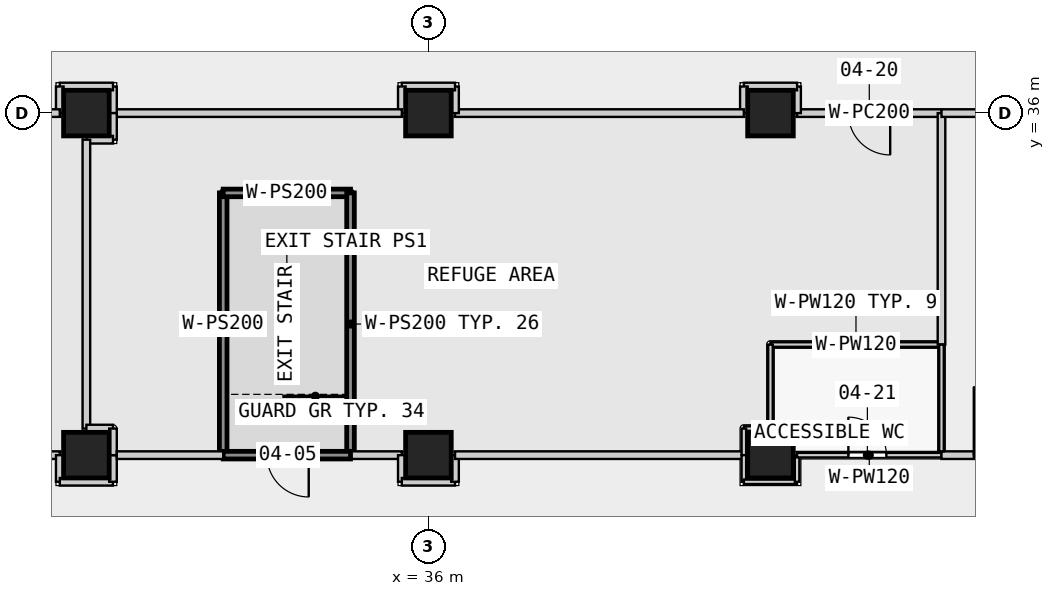
"""IFC4 building model, lengths in metres.
Left out: names, types, materials, properties, quantities, classifications, styles, units other than length and angle.
Written with IfcOpenShell. Run it as: python <this file> out.ifc"""

import sys

from ifc_helpers import new_model, si_unit, direction, frame, frame_2d, origin, origin_2d, place, context, subcontext, project, spatial, rectangle, extrude, element, fill, save


model = new_model("IFC4")
c1 = context("Model", 3, precision=1e-05, world=origin(), true_north=direction((0.0, 1.0)))
c2 = subcontext(c1, "Body", "Model", "MODEL_VIEW")
j1 = project(units=[si_unit("LENGTHUNIT", "METRE"), si_unit("PLANEANGLEUNIT", "RADIAN")], contexts=[c1])
p1 = place(None, origin())
s1 = spatial("IfcSite", under=j1, at=p1, CompositionType="ELEMENT")
p2 = place(p1, origin())
s2 = spatial("IfcBuilding", under=s1, at=p2, CompositionType="ELEMENT")
p3 = place(p2, frame((0.0, 0.0, 21.8)))
s3 = spatial("IfcBuildingStorey", under=s2, at=p3, CompositionType="ELEMENT", Elevation=21.8)
for number, where, z_axis, x_axis in (
    (1, (27.0, 27.0, 0.0), (0.0, 0.0, 1.0), (1.0, 0.0, 0.0)),
    (2, (27.0, 36.0, 0.0), (0.0, 0.0, 1.0), (1.0, 0.0, 0.0)),
    (3, (36.0, 27.0, 0.0), (0.0, 0.0, 1.0), (1.0, 0.0, 0.0)),
    (4, (36.0, 36.0, 0.0), (0.0, 0.0, 1.0), (1.0, 0.0, 0.0)),
    (5, (45.0, 27.0, 0.0), (0.0, 0.0, 1.0), (1.0, 0.0, 0.0)),
    (6, (45.0, 36.0, 0.0), (0.0, 0.0, 1.0), (1.0, 0.0, 0.0)),
):
    element("IfcColumn", number, at=place(p3, frame(where, z_axis=z_axis, x_axis=x_axis)), inside=s3, PredefinedType="COLUMN", context=c2, shape_type="SweptSolid", body=[
        extrude(rectangle(XDim=1.2, YDim=1.2, at=origin_2d()), origin(), (0.0, 0.0, 1.0), 5.0),
    ])
p4 = place(p3, frame((49.5, 36.0, 0.0), z_axis=(0.0, 0.0, 1.0), x_axis=(-1.0, 0.0, 0.0)))
e7 = element("IfcWall", 7, at=p4, inside=s3, PredefinedType="PARTITIONING", context=c2, shape_type="SweptSolid", body=[
    extrude(rectangle(XDim=3.8, YDim=0.2, at=frame_2d((1.9, 0.0))), origin(), (0.0, 0.0, 1.0), 4.5),
])
p5 = place(p4, frame((1.35, 0.0, 0.0)))
e8 = element("IfcOpeningElement", 8, at=p5, cuts=e7, PredefinedType="OPENING", context=c2, shape_type="SweptSolid", body=[
    extrude(rectangle(XDim=1.1, YDim=2.1, at=frame_2d((0.55, 1.05))), frame((0.0, 0.11, 0.0), z_axis=(0.0, -1.0, 0.0), x_axis=(1.0, 0.0, 0.0)), (0.0, 0.0, 1.0), 0.22),
])
p6 = place(p3, frame((45.7, 36.0, 0.0), z_axis=(0.0, 0.0, 1.0), x_axis=(0.0, 1.0, 0.0)))
e9 = element("IfcWall", 9, at=p6, inside=s3, PredefinedType="PARTITIONING", context=c2, shape_type="SweptSolid", body=[
    extrude(rectangle(XDim=0.7, YDim=0.2, at=frame_2d((0.35, 0.0))), origin(), (0.0, 0.0, 1.0), 4.5),
])
p7 = place(p3, frame((45.7, 36.7, 0.0), z_axis=(0.0, 0.0, 1.0), x_axis=(-1.0, 0.0, 0.0)))
e10 = element("IfcWall", 10, at=p7, inside=s3, PredefinedType="PARTITIONING", context=c2, shape_type="SweptSolid", body=[
    extrude(rectangle(XDim=1.4, YDim=0.2, at=frame_2d((0.7, 0.0))), origin(), (0.0, 0.0, 1.0), 4.5),
])
p8 = place(p3, frame((44.3, 36.7, 0.0), z_axis=(0.0, 0.0, 1.0), x_axis=(0.0, -1.0, 0.0)))
e11 = element("IfcWall", 11, at=p8, inside=s3, PredefinedType="PARTITIONING", context=c2, shape_type="SweptSolid", body=[
    extrude(rectangle(XDim=0.7, YDim=0.2, at=frame_2d((0.35, 0.0))), origin(), (0.0, 0.0, 1.0), 4.5),
])
p9 = place(p3, frame((44.3, 36.0, 0.0), z_axis=(0.0, 0.0, 1.0), x_axis=(-1.0, 0.0, 0.0)))
e12 = element("IfcWall", 12, at=p9, inside=s3, PredefinedType="PARTITIONING", context=c2, shape_type="SweptSolid", body=[
    extrude(rectangle(XDim=7.6, YDim=0.2, at=frame_2d((3.8, 0.0))), origin(), (0.0, 0.0, 1.0), 4.5),
])
p10 = place(p3, frame((36.7, 36.0, 0.0), z_axis=(0.0, 0.0, 1.0), x_axis=(0.0, 1.0, 0.0)))
e13 = element("IfcWall", 13, at=p10, inside=s3, PredefinedType="PARTITIONING", context=c2, shape_type="SweptSolid", body=[
    extrude(rectangle(XDim=0.7, YDim=0.2, at=frame_2d((0.35, 0.0))), origin(), (0.0, 0.0, 1.0), 4.5),
])
p11 = place(p3, frame((36.7, 36.7, 0.0), z_axis=(0.0, 0.0, 1.0), x_axis=(-1.0, 0.0, 0.0)))
e14 = element("IfcWall", 14, at=p11, inside=s3, PredefinedType="PARTITIONING", context=c2, shape_type="SweptSolid", body=[
    extrude(rectangle(XDim=1.4, YDim=0.2, at=frame_2d((0.7, 0.0))), origin(), (0.0, 0.0, 1.0), 4.5),
])
p12 = place(p3, frame((35.3, 36.7, 0.0), z_axis=(0.0, 0.0, 1.0), x_axis=(0.0, -1.0, 0.0)))
e15 = element("IfcWall", 15, at=p12, inside=s3, PredefinedType="PARTITIONING", context=c2, shape_type="SweptSolid", body=[
    extrude(rectangle(XDim=0.7, YDim=0.2, at=frame_2d((0.35, 0.0))), origin(), (0.0, 0.0, 1.0), 4.5),
])
p13 = place(p3, frame((35.3, 36.0, 0.0), z_axis=(0.0, 0.0, 1.0), x_axis=(-1.0, 0.0, 0.0)))
e16 = element("IfcWall", 16, at=p13, inside=s3, PredefinedType="PARTITIONING", context=c2, shape_type="SweptSolid", body=[
    extrude(rectangle(XDim=7.6, YDim=0.2, at=frame_2d((3.8, 0.0))), origin(), (0.0, 0.0, 1.0), 4.5),
])
p14 = place(p3, frame((30.6, 27.0, 0.0), z_axis=(0.0, 0.0, 1.0), x_axis=(0.0, 1.0, 0.0)))
e17 = element("IfcWall", 17, at=p14, inside=s3, PredefinedType="PARTITIONING", context=c2, shape_type="SweptSolid", body=[
    extrude(rectangle(XDim=6.9, YDim=0.2, at=frame_2d((3.45, 0.0))), origin(), (0.0, 0.0, 1.0), 4.5),
])
p15 = place(p3, frame((30.6, 33.9, 0.0), z_axis=(0.0, 0.0, 1.0), x_axis=(1.0, 0.0, 0.0)))
e18 = element("IfcWall", 18, at=p15, inside=s3, PredefinedType="PARTITIONING", context=c2, shape_type="SweptSolid", body=[
    extrude(rectangle(XDim=3.35, YDim=0.2, at=frame_2d((1.675, 0.0))), origin(), (0.0, 0.0, 1.0), 4.5),
])
p16 = place(p3, frame((33.95, 33.9, 0.0), z_axis=(0.0, 0.0, 1.0), x_axis=(0.0, -1.0, 0.0)))
e19 = element("IfcWall", 19, at=p16, inside=s3, PredefinedType="PARTITIONING", context=c2, shape_type="SweptSolid", body=[
    extrude(rectangle(XDim=6.9, YDim=0.2, at=frame_2d((3.45, 0.0))), origin(), (0.0, 0.0, 1.0), 4.5),
])
p17 = place(p3, frame((27.7, 36.0, 0.0), z_axis=(0.0, 0.0, 1.0), x_axis=(0.0, 1.0, 0.0)))
e20 = element("IfcWall", 20, at=p17, inside=s3, PredefinedType="PARTITIONING", context=c2, shape_type="SweptSolid", body=[
    extrude(rectangle(XDim=0.7, YDim=0.2, at=frame_2d((0.35, 0.0))), origin(), (0.0, 0.0, 1.0), 4.5),
])
p18 = place(p3, frame((27.7, 36.7, 0.0), z_axis=(0.0, 0.0, 1.0), x_axis=(-1.0, 0.0, 0.0)))
e21 = element("IfcWall", 21, at=p18, inside=s3, PredefinedType="PARTITIONING", context=c2, shape_type="SweptSolid", body=[
    extrude(rectangle(XDim=1.4, YDim=0.2, at=frame_2d((0.7, 0.0))), origin(), (0.0, 0.0, 1.0), 4.5),
])
p19 = place(p3, frame((26.3, 36.7, 0.0), z_axis=(0.0, 0.0, 1.0), x_axis=(0.0, -1.0, 0.0)))
e22 = element("IfcWall", 22, at=p19, inside=s3, PredefinedType="PARTITIONING", context=c2, shape_type="SweptSolid", body=[
    extrude(rectangle(XDim=0.7, YDim=0.2, at=frame_2d((0.35, 0.0))), origin(), (0.0, 0.0, 1.0), 4.5),
])
p20 = place(p3, frame((26.3, 36.0, 0.0), z_axis=(0.0, 0.0, 1.0), x_axis=(-1.0, 0.0, 0.0)))
e23 = element("IfcWall", 23, at=p20, inside=s3, PredefinedType="PARTITIONING", context=c2, shape_type="SweptSolid", body=[
    extrude(rectangle(XDim=7.3, YDim=0.2, at=frame_2d((3.65, 0.0))), origin(), (0.0, 0.0, 1.0), 4.5),
])
p21 = place(p20, frame((3.1, 0.0, 0.0)))
e24 = element("IfcOpeningElement", 24, at=p21, cuts=e23, PredefinedType="OPENING", context=c2, shape_type="SweptSolid", body=[
    extrude(rectangle(XDim=1.1, YDim=2.1, at=frame_2d((0.55, 1.05))), frame((0.0, 0.11, 0.0), z_axis=(0.0, -1.0, 0.0), x_axis=(1.0, 0.0, 0.0)), (0.0, 0.0, 1.0), 0.22),
])
p22 = place(p3, frame((33.95, 27.0, 0.0), z_axis=(0.0, 0.0, 1.0), x_axis=(1.0, 0.0, 0.0)))
e25 = element("IfcWall", 25, at=p22, inside=s3, PredefinedType="PARTITIONING", context=c2, shape_type="SweptSolid", body=[
    extrude(rectangle(XDim=1.35, YDim=0.2, at=frame_2d((0.675, 0.0))), origin(), (0.0, 0.0, 1.0), 4.5),
])
p23 = place(p3, frame((35.3, 27.0, 0.0), z_axis=(0.0, 0.0, 1.0), x_axis=(0.0, -1.0, 0.0)))
e26 = element("IfcWall", 26, at=p23, inside=s3, PredefinedType="PARTITIONING", context=c2, shape_type="SweptSolid", body=[
    extrude(rectangle(XDim=0.7, YDim=0.2, at=frame_2d((0.35, 0.0))), origin(), (0.0, 0.0, 1.0), 4.5),
])
p24 = place(p3, frame((35.3, 26.3, 0.0), z_axis=(0.0, 0.0, 1.0), x_axis=(1.0, 0.0, 0.0)))
e27 = element("IfcWall", 27, at=p24, inside=s3, PredefinedType="PARTITIONING", context=c2, shape_type="SweptSolid", body=[
    extrude(rectangle(XDim=1.4, YDim=0.2, at=frame_2d((0.7, 0.0))), origin(), (0.0, 0.0, 1.0), 4.5),
])
p25 = place(p3, frame((36.7, 26.3, 0.0), z_axis=(0.0, 0.0, 1.0), x_axis=(0.0, 1.0, 0.0)))
e28 = element("IfcWall", 28, at=p25, inside=s3, PredefinedType="PARTITIONING", context=c2, shape_type="SweptSolid", body=[
    extrude(rectangle(XDim=0.7, YDim=0.2, at=frame_2d((0.35, 0.0))), origin(), (0.0, 0.0, 1.0), 4.5),
])
for number, where, z_axis, x_axis in (
    (29, (36.7, 27.0, 0.0), (0.0, 0.0, 1.0), (1.0, 0.0, 0.0)),
    (30, (18.7, 27.0, 0.0), (0.0, 0.0, 1.0), (1.0, 0.0, 0.0)),
):
    element("IfcWall", number, at=place(p3, frame(where, z_axis=z_axis, x_axis=x_axis)), inside=s3, PredefinedType="PARTITIONING", context=c2, shape_type="SweptSolid", body=[
        extrude(rectangle(XDim=7.6, YDim=0.2, at=frame_2d((3.8, 0.0))), origin(), (0.0, 0.0, 1.0), 4.5),
    ])
p26 = place(p3, frame((26.3, 27.0, 0.0), z_axis=(0.0, 0.0, 1.0), x_axis=(0.0, -1.0, 0.0)))
e31 = element("IfcWall", 31, at=p26, inside=s3, PredefinedType="PARTITIONING", context=c2, shape_type="SweptSolid", body=[
    extrude(rectangle(XDim=0.7, YDim=0.2, at=frame_2d((0.35, 0.0))), origin(), (0.0, 0.0, 1.0), 4.5),
])
p27 = place(p3, frame((26.3, 26.3, 0.0), z_axis=(0.0, 0.0, 1.0), x_axis=(1.0, 0.0, 0.0)))
e32 = element("IfcWall", 32, at=p27, inside=s3, PredefinedType="PARTITIONING", context=c2, shape_type="SweptSolid", body=[
    extrude(rectangle(XDim=1.4, YDim=0.2, at=frame_2d((0.7, 0.0))), origin(), (0.0, 0.0, 1.0), 4.5),
])
for number, where, z_axis, x_axis in (
    (33, (27.7, 26.3, 0.0), (0.0, 0.0, 1.0), (0.0, 1.0, 0.0)),
    (34, (27.7, 36.0, 0.0), (0.0, 0.0, 1.0), (0.0, -1.0, 0.0)),
    (35, (27.7, 35.3, 0.0), (0.0, 0.0, 1.0), (-1.0, 0.0, 0.0)),
):
    element("IfcWall", number, at=place(p3, frame(where, z_axis=z_axis, x_axis=x_axis)), inside=s3, PredefinedType="PARTITIONING", context=c2, shape_type="SweptSolid", body=[
        extrude(rectangle(XDim=0.7, YDim=0.2, at=frame_2d((0.35, 0.0))), origin(), (0.0, 0.0, 1.0), 4.5),
    ])
p28 = place(p3, frame((27.0, 35.3, 0.0), z_axis=(0.0, 0.0, 1.0), x_axis=(0.0, -1.0, 0.0)))
e36 = element("IfcWall", 36, at=p28, inside=s3, PredefinedType="PARTITIONING", context=c2, shape_type="SweptSolid", body=[
    extrude(rectangle(XDim=7.6, YDim=0.2, at=frame_2d((3.8, 0.0))), origin(), (0.0, 0.0, 1.0), 4.5),
])
for number, where, z_axis, x_axis in (
    (37, (27.0, 27.7, 0.0), (0.0, 0.0, 1.0), (1.0, 0.0, 0.0)),
    (38, (27.7, 27.7, 0.0), (0.0, 0.0, 1.0), (0.0, -1.0, 0.0)),
):
    element("IfcWall", number, at=place(p3, frame(where, z_axis=z_axis, x_axis=x_axis)), inside=s3, PredefinedType="PARTITIONING", context=c2, shape_type="SweptSolid", body=[
        extrude(rectangle(XDim=0.7, YDim=0.2, at=frame_2d((0.35, 0.0))), origin(), (0.0, 0.0, 1.0), 4.5),
    ])
p29 = place(p3, frame((49.5, 29.911, 0.0), z_axis=(0.0, 0.0, 1.0), x_axis=(-1.0, 0.0, 0.0)))
e39 = element("IfcWall", 39, at=p29, inside=s3, PredefinedType="PARTITIONING", context=c2, shape_type="SweptSolid", body=[
    extrude(rectangle(XDim=4.5, YDim=0.12, at=frame_2d((2.25, 0.0))), origin(), (0.0, 0.0, 1.0), 4.5),
])
p30 = place(p3, frame((45.0, 29.911, 0.0), z_axis=(0.0, 0.0, 1.0), x_axis=(0.0, -1.0, 0.0)))
e40 = element("IfcWall", 40, at=p30, inside=s3, PredefinedType="PARTITIONING", context=c2, shape_type="SweptSolid", body=[
    extrude(rectangle(XDim=2.211, YDim=0.12, at=frame_2d((1.105, 0.0))), origin(), (0.0, 0.0, 1.0), 4.5),
])
for number, where, z_axis, x_axis in (
    (41, (45.0, 27.7, 0.0), (0.0, 0.0, 1.0), (-1.0, 0.0, 0.0)),
    (42, (44.3, 27.7, 0.0), (0.0, 0.0, 1.0), (0.0, -1.0, 0.0)),
    (43, (44.3, 27.0, 0.0), (0.0, 0.0, 1.0), (0.0, -1.0, 0.0)),
):
    element("IfcWall", number, at=place(p3, frame(where, z_axis=z_axis, x_axis=x_axis)), inside=s3, PredefinedType="PARTITIONING", context=c2, shape_type="SweptSolid", body=[
        extrude(rectangle(XDim=0.7, YDim=0.12, at=frame_2d((0.35, 0.0))), origin(), (0.0, 0.0, 1.0), 4.5),
    ])
p31 = place(p3, frame((44.3, 26.3, 0.0), z_axis=(0.0, 0.0, 1.0), x_axis=(1.0, 0.0, 0.0)))
e44 = element("IfcWall", 44, at=p31, inside=s3, PredefinedType="PARTITIONING", context=c2, shape_type="SweptSolid", body=[
    extrude(rectangle(XDim=1.4, YDim=0.12, at=frame_2d((0.7, 0.0))), origin(), (0.0, 0.0, 1.0), 4.5),
])
p32 = place(p3, frame((45.7, 26.3, 0.0), z_axis=(0.0, 0.0, 1.0), x_axis=(0.0, 1.0, 0.0)))
e45 = element("IfcWall", 45, at=p32, inside=s3, PredefinedType="PARTITIONING", context=c2, shape_type="SweptSolid", body=[
    extrude(rectangle(XDim=0.7, YDim=0.12, at=frame_2d((0.35, 0.0))), origin(), (0.0, 0.0, 1.0), 4.5),
])
p33 = place(p3, frame((45.7, 27.0, 0.0), z_axis=(0.0, 0.0, 1.0), x_axis=(1.0, 0.0, 0.0)))
e46 = element("IfcWall", 46, at=p33, inside=s3, PredefinedType="PARTITIONING", context=c2, shape_type="SweptSolid", body=[
    extrude(rectangle(XDim=3.8, YDim=0.12, at=frame_2d((1.9, 0.0))), origin(), (0.0, 0.0, 1.0), 4.5),
])
p34 = place(p33, frame((1.35, 0.0, 0.0)))
e47 = element("IfcOpeningElement", 47, at=p34, cuts=e46, PredefinedType="OPENING", context=c2, shape_type="SweptSolid", body=[
    extrude(rectangle(XDim=1.0, YDim=2.1, at=frame_2d((0.5, 1.05))), frame((0.0, 0.07, 0.0), z_axis=(0.0, -1.0, 0.0), x_axis=(1.0, 0.0, 0.0)), (0.0, 0.0, 1.0), 0.14),
])
p35 = place(p3, frame((49.5, 29.911, 0.0), z_axis=(0.0, 0.0, 1.0), x_axis=(0.0, 1.0, 0.0)))
e48 = element("IfcWall", 48, at=p35, inside=s3, PredefinedType="PARTITIONING", context=c2, shape_type="SweptSolid", body=[
    extrude(rectangle(XDim=6.089, YDim=0.2, at=frame_2d((3.044, 0.0))), origin(), (0.0, 0.0, 1.0), 4.5),
])
p36 = place(p3, frame((53.2, 36.0, 0.0), z_axis=(0.0, 0.0, 1.0), x_axis=(-1.0, 0.0, 0.0)))
e49 = element("IfcWall", 49, at=p36, inside=s3, PredefinedType="PARTITIONING", context=c2, shape_type="SweptSolid", body=[
    extrude(rectangle(XDim=3.7, YDim=0.2, at=frame_2d((1.85, 0.0))), origin(), (0.0, 0.0, 1.0), 4.5),
])
p37 = place(p36, frame((0.85, 0.0, 0.0)))
e50 = element("IfcOpeningElement", 50, at=p37, cuts=e49, PredefinedType="OPENING", context=c2, shape_type="SweptSolid", body=[
    extrude(rectangle(XDim=1.8, YDim=2.1, at=frame_2d((0.9, 1.05))), frame((0.0, 0.11, 0.0), z_axis=(0.0, -1.0, 0.0), x_axis=(1.0, 0.0, 0.0)), (0.0, 0.0, 1.0), 0.22),
])
p38 = place(p3, frame((49.5, 27.0, 0.0), z_axis=(0.0, 0.0, 1.0), x_axis=(1.0, 0.0, 0.0)))
e51 = element("IfcWall", 51, at=p38, inside=s3, PredefinedType="PARTITIONING", context=c2, shape_type="SweptSolid", body=[
    extrude(rectangle(XDim=3.7, YDim=0.2, at=frame_2d((1.85, 0.0))), origin(), (0.0, 0.0, 1.0), 4.5),
])
p39 = place(p38, frame((0.85, 0.0, 0.0)))
e52 = element("IfcOpeningElement", 52, at=p39, cuts=e51, PredefinedType="OPENING", context=c2, shape_type="SweptSolid", body=[
    extrude(rectangle(XDim=1.8, YDim=2.1, at=frame_2d((0.9, 1.05))), frame((0.0, 0.11, 0.0), z_axis=(0.0, -1.0, 0.0), x_axis=(1.0, 0.0, 0.0)), (0.0, 0.0, 1.0), 0.22),
])
p40 = place(p3, frame((33.95, 27.0, 0.0), z_axis=(0.0, 0.0, 1.0), x_axis=(-1.0, 0.0, 0.0)))
e53 = element("IfcWall", 53, at=p40, inside=s3, PredefinedType="PARTITIONING", context=c2, shape_type="SweptSolid", body=[
    extrude(rectangle(XDim=3.35, YDim=0.2, at=frame_2d((1.675, 0.0))), origin(), (0.0, 0.0, 1.0), 4.5),
])
p41 = place(p40, frame((1.1, 0.0, 0.0)))
e54 = element("IfcOpeningElement", 54, at=p41, cuts=e53, PredefinedType="OPENING", context=c2, shape_type="SweptSolid", body=[
    extrude(rectangle(XDim=1.1, YDim=2.1, at=frame_2d((0.55, 1.05))), frame((0.0, 0.11, 0.0), z_axis=(0.0, -1.0, 0.0), x_axis=(1.0, 0.0, 0.0)), (0.0, 0.0, 1.0), 0.22),
])
p42 = place(p3, frame((49.5, 27.1, 0.0), z_axis=(0.0, 0.0, 1.0), x_axis=(0.0, 1.0, 0.0)))
e55 = element("IfcWall", 55, at=p42, inside=s3, PredefinedType="PARTITIONING", context=c2, shape_type="SweptSolid", body=[
    extrude(rectangle(XDim=2.811, YDim=0.12, at=frame_2d((1.405, 0.0))), origin(), (0.0, 0.0, 1.0), 4.5),
])
p43 = place(p3, frame((27.8, 27.0, 0.0), z_axis=(0.0, 0.0, 1.0), x_axis=(1.0, 0.0, 0.0)))
e56 = element("IfcWall", 56, at=p43, inside=s3, PredefinedType="PARTITIONING", context=c2, shape_type="SweptSolid", body=[
    extrude(rectangle(XDim=2.8, YDim=0.2, at=frame_2d((1.4, 0.0))), origin(), (0.0, 0.0, 1.0), 4.5),
])
p44 = place(p41, origin())
e57 = element("IfcDoor", 57, at=p44, inside=s3, OperationType="SINGLE_SWING_LEFT", PredefinedType="DOOR", context=c2, shape_type="SweptSolid", body=[
    extrude(rectangle(XDim=1.1, YDim=2.1, at=frame_2d((0.55, 1.05))), frame((0.0, 0.025, 0.0), z_axis=(0.0, -1.0, 0.0), x_axis=(1.0, 0.0, 0.0)), (0.0, 0.0, 1.0), 0.05),
])
fill(e54, e57)
p45 = place(p5, origin())
e58 = element("IfcDoor", 58, at=p45, inside=s3, OperationType="SINGLE_SWING_LEFT", PredefinedType="DOOR", context=c2, shape_type="SweptSolid", body=[
    extrude(rectangle(XDim=1.1, YDim=2.1, at=frame_2d((0.55, 1.05))), frame((0.0, 0.025, 0.0), z_axis=(0.0, -1.0, 0.0), x_axis=(1.0, 0.0, 0.0)), (0.0, 0.0, 1.0), 0.05),
])
fill(e8, e58)
p46 = place(p34, origin())
e59 = element("IfcDoor", 59, at=p46, inside=s3, OperationType="SINGLE_SWING_LEFT", PredefinedType="DOOR", context=c2, shape_type="SweptSolid", body=[
    extrude(rectangle(XDim=1.0, YDim=2.1, at=frame_2d((0.5, 1.05))), frame((0.0, 0.025, 0.0), z_axis=(0.0, -1.0, 0.0), x_axis=(1.0, 0.0, 0.0)), (0.0, 0.0, 1.0), 0.05),
])
fill(e47, e59)
p47 = place(p39, origin())
e60 = element("IfcDoor", 60, at=p47, inside=s3, OperationType="DOUBLE_DOOR_SINGLE_SWING", PredefinedType="DOOR", context=c2, shape_type="SweptSolid", body=[
    extrude(rectangle(XDim=1.8, YDim=2.1, at=frame_2d((0.9, 1.05))), frame((0.0, 0.025, 0.0), z_axis=(0.0, -1.0, 0.0), x_axis=(1.0, 0.0, 0.0)), (0.0, 0.0, 1.0), 0.05),
])
fill(e52, e60)
save(model, sys.argv[1])
